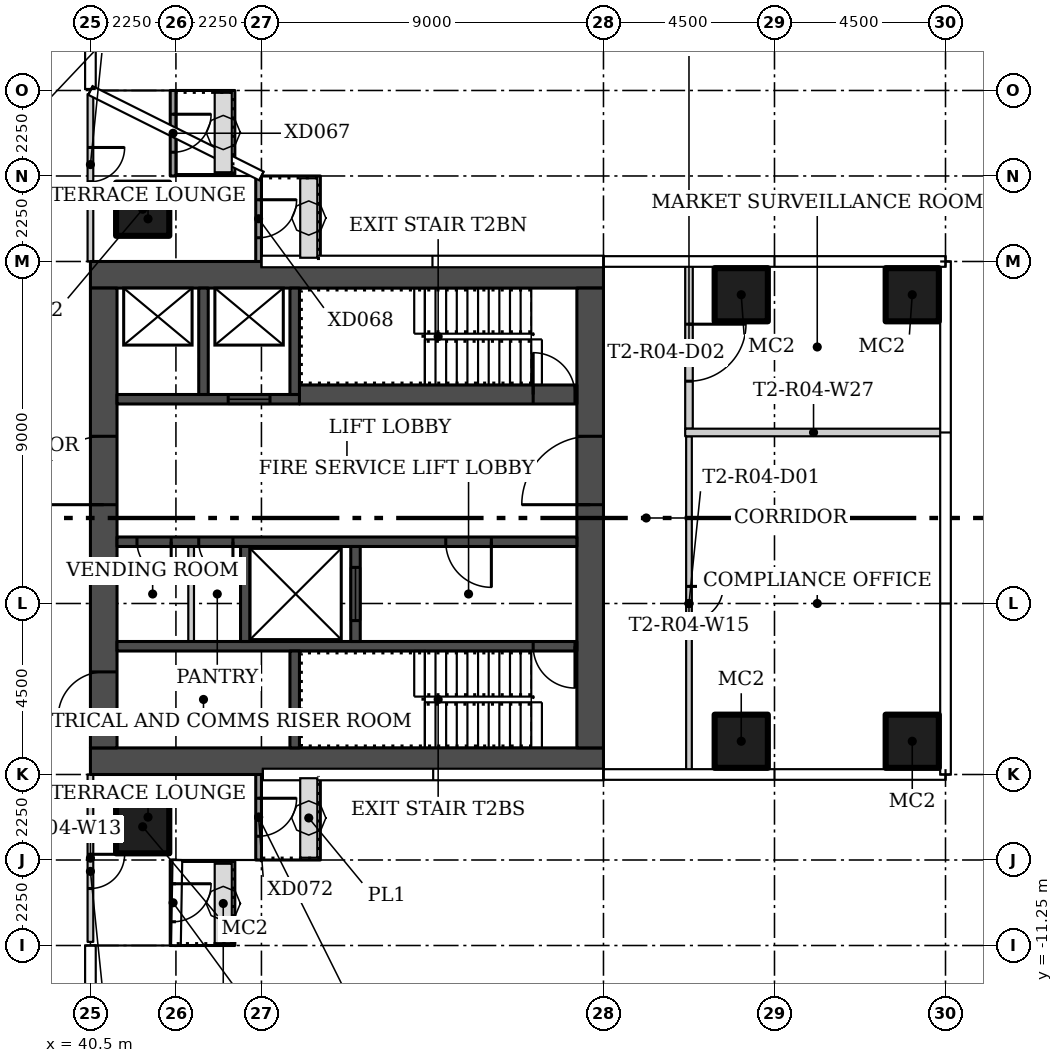
"""IFC4 building model, lengths in metres.
Left out: names, types, materials, properties, quantities, classifications, styles, units other than length and angle.
Written with IfcOpenShell. Run it as: python <this file> out.ifc"""

import sys

from ifc_helpers import new_model, si_unit, direction, frame, frame_2d, origin, origin_2d, place, context, subcontext, project, spatial, rectangle, hollow_rectangle, extrude, element, fill, save


model = new_model("IFC4")
c1 = context("Model", 3, precision=1e-05, world=origin(), true_north=direction((0.0, 1.0)))
c2 = subcontext(c1, "Body", "Model", "MODEL_VIEW")
j1 = project(units=[si_unit("LENGTHUNIT", "METRE"), si_unit("PLANEANGLEUNIT", "RADIAN")], contexts=[c1])
p1 = place(None, origin())
s1 = spatial("IfcSite", under=j1, at=p1, CompositionType="ELEMENT")
p2 = place(p1, origin())
s2 = spatial("IfcBuilding", under=s1, at=p2, CompositionType="ELEMENT")
p3 = place(p2, frame((0.0, 0.0, 53.7)))
s3 = spatial("IfcBuildingStorey", under=s2, at=p3, CompositionType="ELEMENT", Elevation=53.7)
for number, where in (
    (1, (41.875, 8.125, 0.0)),
    (2, (41.875, -8.125, 0.0)),
    (3, (57.625, -5.875, 0.0)),
    (4, (62.125, -5.875, 0.0)),
    (5, (57.625, 5.875, 0.0)),
    (6, (62.125, 5.875, 0.0)),
):
    element("IfcColumn", number, at=place(p3, frame(where)), inside=s3, PredefinedType="COLUMN", context=c2, shape_type="SweptSolid", body=[
        extrude(hollow_rectangle(XDim=1.4, YDim=1.4, WallThickness=0.05, at=origin_2d()), origin(), (0.0, 0.0, 1.0), 3.55),
    ])
p4 = place(p3, frame((40.5, -6.75, 0.0), z_axis=(0.0, 0.0, 1.0), x_axis=(0.0, -1.0, 0.0)))
e7 = element("IfcWall", 7, at=p4, inside=s3, PredefinedType="PARTITIONING", context=c2, shape_type="SweptSolid", body=[
    extrude(rectangle(XDim=4.405, YDim=0.15, at=frame_2d((2.203, 0.0))), origin(), (0.0, 0.0, 1.0), 3.55),
])
p5 = place(p4, frame((2.1, 0.0, 0.0)))
e8 = element("IfcOpeningElement", 8, at=p5, cuts=e7, PredefinedType="OPENING", context=c2, shape_type="SweptSolid", body=[
    extrude(rectangle(XDim=0.9, YDim=2.1, at=frame_2d((0.45, 1.05))), frame((0.0, 0.085, 0.0), z_axis=(0.0, -1.0, 0.0), x_axis=(1.0, 0.0, 0.0)), (0.0, 0.0, 1.0), 0.17),
])
p6 = place(p3, frame((40.5, 11.155, 0.0), z_axis=(0.0, 0.0, 1.0), x_axis=(0.0, -1.0, 0.0)))
e9 = element("IfcWall", 9, at=p6, inside=s3, PredefinedType="PARTITIONING", context=c2, shape_type="SweptSolid", body=[
    extrude(rectangle(XDim=4.405, YDim=0.15, at=frame_2d((2.203, 0.0))), origin(), (0.0, 0.0, 1.0), 3.55),
])
p7 = place(p6, frame((1.405, 0.0, 0.0)))
e10 = element("IfcOpeningElement", 10, at=p7, cuts=e9, PredefinedType="OPENING", context=c2, shape_type="SweptSolid", body=[
    extrude(rectangle(XDim=0.9, YDim=2.1, at=frame_2d((0.45, 1.05))), frame((0.0, 0.085, 0.0), z_axis=(0.0, -1.0, 0.0), x_axis=(1.0, 0.0, 0.0)), (0.0, 0.0, 1.0), 0.17),
])
p8 = place(p3, frame((56.25, 2.15, 0.0), z_axis=(0.0, 0.0, 1.0), x_axis=(0.0, -1.0, 0.0)))
e11 = element("IfcWall", 11, at=p8, inside=s3, PredefinedType="PARTITIONING", context=c2, shape_type="SweptSolid", body=[
    extrude(rectangle(XDim=8.805, YDim=0.15, at=frame_2d((4.402, 0.0))), origin(), (0.0, 0.0, 1.0), 3.55),
])
p9 = place(p8, frame((3.95, 0.0, 0.0)))
e12 = element("IfcOpeningElement", 12, at=p9, cuts=e11, PredefinedType="OPENING", context=c2, shape_type="SweptSolid", body=[
    extrude(rectangle(XDim=0.9, YDim=2.1, at=frame_2d((0.45, 1.05))), frame((0.0, 0.085, 0.0), z_axis=(0.0, -1.0, 0.0), x_axis=(1.0, 0.0, 0.0)), (0.0, 0.0, 1.0), 0.17),
])
p10 = place(p3, frame((56.25, 6.655, 0.0), z_axis=(0.0, 0.0, 1.0), x_axis=(0.0, -1.0, 0.0)))
e13 = element("IfcWall", 13, at=p10, inside=s3, PredefinedType="PARTITIONING", context=c2, shape_type="SweptSolid", body=[
    extrude(rectangle(XDim=4.305, YDim=0.2, at=frame_2d((2.152, 0.0))), origin(), (0.0, 0.0, 1.0), 3.55),
])
p11 = place(p10, frame((1.555, 0.0, 0.0)))
e14 = element("IfcOpeningElement", 14, at=p11, cuts=e13, PredefinedType="OPENING", context=c2, shape_type="SweptSolid", body=[
    extrude(rectangle(XDim=1.5, YDim=2.1, at=frame_2d((0.75, 1.05))), frame((0.0, 0.11, 0.0), z_axis=(0.0, -1.0, 0.0), x_axis=(1.0, 0.0, 0.0)), (0.0, 0.0, 1.0), 0.22),
])
p12 = place(p3, frame((62.905, 2.25, 0.0), z_axis=(0.0, 0.0, 1.0), x_axis=(-1.0, 0.0, 0.0)))
e15 = element("IfcWall", 15, at=p12, inside=s3, PredefinedType="PARTITIONING", context=c2, shape_type="SweptSolid", body=[
    extrude(rectangle(XDim=6.755, YDim=0.2, at=frame_2d((3.377, 0.0))), origin(), (0.0, 0.0, 1.0), 3.55),
])
p13 = place(p3, frame((42.675, 11.25, 0.0), z_axis=(0.0, 0.0, 1.0), x_axis=(0.0, -1.0, 0.0)))
e16 = element("IfcWall", 16, at=p13, inside=s3, PredefinedType="SOLIDWALL", context=c2, shape_type="SweptSolid", body=[
    extrude(rectangle(XDim=2.25, YDim=0.15, at=frame_2d((1.125, 0.0))), origin(), (0.0, 0.0, 1.0), 3.45),
])
p14 = place(p13, frame((0.625, 0.0, 0.0)))
e17 = element("IfcOpeningElement", 17, at=p14, cuts=e16, PredefinedType="OPENING", context=c2, shape_type="SweptSolid", body=[
    extrude(rectangle(XDim=1.0, YDim=2.4, at=frame_2d((0.5, 1.2))), frame((0.0, 0.085, 0.0), z_axis=(0.0, -1.0, 0.0), x_axis=(1.0, 0.0, 0.0)), (0.0, 0.0, 1.0), 0.17),
])
p15 = place(p3, frame((44.925, 9.0, 0.0), z_axis=(0.0, 0.0, 1.0), x_axis=(0.0, -1.0, 0.0)))
e18 = element("IfcWall", 18, at=p15, inside=s3, PredefinedType="SOLIDWALL", context=c2, shape_type="SweptSolid", body=[
    extrude(rectangle(XDim=2.257, YDim=0.15, at=frame_2d((1.128, 0.0))), origin(), (0.0, 0.0, 1.0), 3.45),
])
p16 = place(p15, frame((0.625, 0.0, 0.0)))
e19 = element("IfcOpeningElement", 19, at=p16, cuts=e18, PredefinedType="OPENING", context=c2, shape_type="SweptSolid", body=[
    extrude(rectangle(XDim=1.0, YDim=2.4, at=frame_2d((0.5, 1.2))), frame((0.0, 0.085, 0.0), z_axis=(0.0, -1.0, 0.0), x_axis=(1.0, 0.0, 0.0)), (0.0, 0.0, 1.0), 0.17),
])
p17 = place(p3, frame((42.675, -9.0, 0.0), z_axis=(0.0, 0.0, 1.0), x_axis=(0.0, -1.0, 0.0)))
e20 = element("IfcWall", 20, at=p17, inside=s3, PredefinedType="SOLIDWALL", context=c2, shape_type="SweptSolid", body=[
    extrude(rectangle(XDim=2.25, YDim=0.15, at=frame_2d((1.125, 0.0))), origin(), (0.0, 0.0, 1.0), 3.45),
])
p18 = place(p17, frame((0.625, 0.0, 0.0)))
e21 = element("IfcOpeningElement", 21, at=p18, cuts=e20, PredefinedType="OPENING", context=c2, shape_type="SweptSolid", body=[
    extrude(rectangle(XDim=1.0, YDim=2.4, at=frame_2d((0.5, 1.2))), frame((0.0, 0.085, 0.0), z_axis=(0.0, -1.0, 0.0), x_axis=(1.0, 0.0, 0.0)), (0.0, 0.0, 1.0), 0.17),
])
p19 = place(p3, frame((44.925, -6.743, 0.0), z_axis=(0.0, 0.0, 1.0), x_axis=(0.0, -1.0, 0.0)))
e22 = element("IfcWall", 22, at=p19, inside=s3, PredefinedType="SOLIDWALL", context=c2, shape_type="SweptSolid", body=[
    extrude(rectangle(XDim=2.257, YDim=0.15, at=frame_2d((1.128, 0.0))), origin(), (0.0, 0.0, 1.0), 3.45),
])
p20 = place(p19, frame((0.632, 0.0, 0.0)))
e23 = element("IfcOpeningElement", 23, at=p20, cuts=e22, PredefinedType="OPENING", context=c2, shape_type="SweptSolid", body=[
    extrude(rectangle(XDim=1.0, YDim=2.4, at=frame_2d((0.5, 1.2))), frame((0.0, 0.085, 0.0), z_axis=(0.0, -1.0, 0.0), x_axis=(1.0, 0.0, 0.0)), (0.0, 0.0, 1.0), 0.17),
])
for number, where, z_axis, x_axis in (
    (24, (54.0, -6.4, 0.0), (0.0, 0.0, 1.0), (-1.0, 0.0, 0.0)),
    (25, (54.0, 6.4, 0.0), (0.0, 0.0, 1.0), (-1.0, 0.0, 0.0)),
):
    element("IfcWall", number, at=place(p3, frame(where, z_axis=z_axis, x_axis=x_axis)), inside=s3, PredefinedType="SHEAR", context=c2, shape_type="SweptSolid", body=[
        extrude(rectangle(XDim=13.5, YDim=0.7, at=frame_2d((6.75, 0.0))), origin(), (0.0, 0.0, 1.0), 3.55),
    ])
p21 = place(p3, frame((53.65, -6.05, 0.0), z_axis=(0.0, 0.0, 1.0), x_axis=(0.0, 1.0, 0.0)))
e26 = element("IfcWall", 26, at=p21, inside=s3, PredefinedType="SHEAR", context=c2, shape_type="SweptSolid", body=[
    extrude(rectangle(XDim=12.1, YDim=0.7, at=frame_2d((6.05, 0.0))), origin(), (0.0, 0.0, 1.0), 3.55),
])
p22 = place(p21, frame((6.4, 0.0, 0.0)))
e27 = element("IfcOpeningElement", 27, at=p22, cuts=e26, PredefinedType="OPENING", context=c2, shape_type="SweptSolid", body=[
    extrude(rectangle(XDim=1.8, YDim=2.4, at=frame_2d((0.9, 1.2))), frame((0.0, 0.36, 0.0), z_axis=(0.0, -1.0, 0.0), x_axis=(1.0, 0.0, 0.0)), (0.0, 0.0, 1.0), 0.72),
])
p23 = place(p3, frame((40.85, -6.05, 0.0), z_axis=(0.0, 0.0, 1.0), x_axis=(0.0, 1.0, 0.0)))
e28 = element("IfcWall", 28, at=p23, inside=s3, PredefinedType="SHEAR", context=c2, shape_type="SweptSolid", body=[
    extrude(rectangle(XDim=12.1, YDim=0.7, at=frame_2d((6.05, 0.0))), origin(), (0.0, 0.0, 1.0), 3.55),
])
p24 = place(p23, frame((0.8, 0.0, 0.0)))
e29 = element("IfcOpeningElement", 29, at=p24, cuts=e28, PredefinedType="OPENING", context=c2, shape_type="SweptSolid", body=[
    extrude(rectangle(XDim=1.2, YDim=2.1, at=frame_2d((0.6, 1.05))), frame((0.0, 0.36, 0.0), z_axis=(0.0, -1.0, 0.0), x_axis=(1.0, 0.0, 0.0)), (0.0, 0.0, 1.0), 0.72),
])
p25 = place(p23, frame((6.4, 0.0, 0.0)))
e30 = element("IfcOpeningElement", 30, at=p25, cuts=e28, PredefinedType="OPENING", context=c2, shape_type="SweptSolid", body=[
    extrude(rectangle(XDim=1.8, YDim=2.4, at=frame_2d((0.9, 1.2))), frame((0.0, 0.36, 0.0), z_axis=(0.0, -1.0, 0.0), x_axis=(1.0, 0.0, 0.0)), (0.0, 0.0, 1.0), 0.72),
])
p26 = place(p3, frame((53.3, -3.375, 0.0), z_axis=(0.0, 0.0, 1.0), x_axis=(-1.0, 0.0, 0.0)))
e31 = element("IfcWall", 31, at=p26, inside=s3, PredefinedType="SHEAR", context=c2, shape_type="SweptSolid", body=[
    extrude(rectangle(XDim=12.1, YDim=0.25, at=frame_2d((6.05, 0.0))), origin(), (0.0, 0.0, 1.0), 3.55),
])
p27 = place(p26, frame((0.05, 0.0, 0.0)))
e32 = element("IfcOpeningElement", 32, at=p27, cuts=e31, PredefinedType="OPENING", context=c2, shape_type="SweptSolid", body=[
    extrude(rectangle(XDim=1.1, YDim=2.1, at=frame_2d((0.55, 1.05))), frame((0.0, 0.135, 0.0), z_axis=(0.0, -1.0, 0.0), x_axis=(1.0, 0.0, 0.0)), (0.0, 0.0, 1.0), 0.27),
])
p28 = place(p3, frame((45.875, -6.05, 0.0), z_axis=(0.0, 0.0, 1.0), x_axis=(0.0, 1.0, 0.0)))
e33 = element("IfcWall", 33, at=p28, inside=s3, PredefinedType="SHEAR", context=c2, shape_type="SweptSolid", body=[
    extrude(rectangle(XDim=2.55, YDim=0.25, at=frame_2d((1.275, 0.0))), origin(), (0.0, 0.0, 1.0), 3.55),
])
p29 = place(p3, frame((53.3, -0.625, 0.0), z_axis=(0.0, 0.0, 1.0), x_axis=(-1.0, 0.0, 0.0)))
e34 = element("IfcWall", 34, at=p29, inside=s3, PredefinedType="SHEAR", context=c2, shape_type="SweptSolid", body=[
    extrude(rectangle(XDim=12.1, YDim=0.25, at=frame_2d((6.05, 0.0))), origin(), (0.0, 0.0, 1.0), 3.55),
])
p30 = place(p29, frame((2.25, 0.0, 0.0)))
e35 = element("IfcOpeningElement", 35, at=p30, cuts=e34, PredefinedType="OPENING", context=c2, shape_type="SweptSolid", body=[
    extrude(rectangle(XDim=1.2, YDim=2.1, at=frame_2d((0.6, 1.05))), frame((0.0, 0.135, 0.0), z_axis=(0.0, -1.0, 0.0), x_axis=(1.0, 0.0, 0.0)), (0.0, 0.0, 1.0), 0.27),
])
p31 = place(p29, frame((9.05, 0.0, 0.0)))
e36 = element("IfcOpeningElement", 36, at=p31, cuts=e34, PredefinedType="OPENING", context=c2, shape_type="SweptSolid", body=[
    extrude(rectangle(XDim=0.9, YDim=2.1, at=frame_2d((0.45, 1.05))), frame((0.0, 0.135, 0.0), z_axis=(0.0, -1.0, 0.0), x_axis=(1.0, 0.0, 0.0)), (0.0, 0.0, 1.0), 0.27),
])
p32 = place(p29, frame((10.675, 0.0, 0.0)))
e37 = element("IfcOpeningElement", 37, at=p32, cuts=e34, PredefinedType="OPENING", context=c2, shape_type="SweptSolid", body=[
    extrude(rectangle(XDim=0.9, YDim=2.1, at=frame_2d((0.45, 1.05))), frame((0.0, 0.135, 0.0), z_axis=(0.0, -1.0, 0.0), x_axis=(1.0, 0.0, 0.0)), (0.0, 0.0, 1.0), 0.27),
])
p33 = place(p3, frame((47.475, -3.25, 0.0), z_axis=(0.0, 0.0, 1.0), x_axis=(0.0, 1.0, 0.0)))
e38 = element("IfcWall", 38, at=p33, inside=s3, PredefinedType="SHEAR", context=c2, shape_type="SweptSolid", body=[
    extrude(rectangle(XDim=2.5, YDim=0.25, at=frame_2d((1.25, 0.0))), origin(), (0.0, 0.0, 1.0), 3.55),
])
p34 = place(p33, frame((0.55, 0.0, 0.0)))
e39 = element("IfcOpeningElement", 39, at=p34, cuts=e38, PredefinedType="OPENING", context=c2, shape_type="SweptSolid", body=[
    extrude(rectangle(XDim=1.4, YDim=2.4, at=frame_2d((0.7, 1.2))), frame((0.0, 0.135, 0.0), z_axis=(0.0, -1.0, 0.0), x_axis=(1.0, 0.0, 0.0)), (0.0, 0.0, 1.0), 0.27),
])
p35 = place(p3, frame((44.575, -3.25, 0.0), z_axis=(0.0, 0.0, 1.0), x_axis=(0.0, 1.0, 0.0)))
e40 = element("IfcWall", 40, at=p35, inside=s3, PredefinedType="SHEAR", context=c2, shape_type="SweptSolid", body=[
    extrude(rectangle(XDim=2.5, YDim=0.25, at=frame_2d((1.25, 0.0))), origin(), (0.0, 0.0, 1.0), 3.55),
])
p36 = place(p3, frame((43.15, -3.25, 0.0), z_axis=(0.0, 0.0, 1.0), x_axis=(0.0, 1.0, 0.0)))
e41 = element("IfcWall", 41, at=p36, inside=s3, PredefinedType="PARTITIONING", context=c2, shape_type="SweptSolid", body=[
    extrude(rectangle(XDim=2.5, YDim=0.15, at=frame_2d((1.25, 0.0))), origin(), (0.0, 0.0, 1.0), 3.55),
])
p37 = place(p3, frame((46.0, 3.25, 0.0)))
e42 = element("IfcWall", 42, at=p37, inside=s3, PredefinedType="SHEAR", context=c2, shape_type="SweptSolid", body=[
    extrude(rectangle(XDim=7.3, YDim=0.5, at=frame_2d((3.65, 0.0))), origin(), (0.0, 0.0, 1.0), 3.55),
])
p38 = place(p37, frame((6.15, 0.0, 0.0)))
e43 = element("IfcOpeningElement", 43, at=p38, cuts=e42, PredefinedType="OPENING", context=c2, shape_type="SweptSolid", body=[
    extrude(rectangle(XDim=1.1, YDim=2.1, at=frame_2d((0.55, 1.05))), frame((0.0, 0.26, 0.0), z_axis=(0.0, -1.0, 0.0), x_axis=(1.0, 0.0, 0.0)), (0.0, 0.0, 1.0), 0.52),
])
p39 = place(p3, frame((46.0, 3.125, 0.0), z_axis=(0.0, 0.0, 1.0), x_axis=(-1.0, 0.0, 0.0)))
e44 = element("IfcWall", 44, at=p39, inside=s3, PredefinedType="SHEAR", context=c2, shape_type="SweptSolid", body=[
    extrude(rectangle(XDim=4.8, YDim=0.25, at=frame_2d((2.4, 0.0))), origin(), (0.0, 0.0, 1.0), 3.55),
])
p40 = place(p39, frame((0.775, 0.0, 0.0)))
e45 = element("IfcOpeningElement", 45, at=p40, cuts=e44, PredefinedType="OPENING", context=c2, shape_type="SweptSolid", body=[
    extrude(rectangle(XDim=1.1, YDim=2.1, at=frame_2d((0.55, 1.05))), frame((0.0, 0.135, 0.0), z_axis=(0.0, -1.0, 0.0), x_axis=(1.0, 0.0, 0.0)), (0.0, 0.0, 1.0), 0.27),
])
for number, where, z_axis, x_axis in (
    (46, (45.875, 3.25, 0.0), (0.0, 0.0, 1.0), (0.0, 1.0, 0.0)),
    (47, (43.475, 3.25, 0.0), (0.0, 0.0, 1.0), (0.0, 1.0, 0.0)),
):
    element("IfcWall", number, at=place(p3, frame(where, z_axis=z_axis, x_axis=x_axis)), inside=s3, PredefinedType="SHEAR", context=c2, shape_type="SweptSolid", body=[
        extrude(rectangle(XDim=2.8, YDim=0.25, at=frame_2d((1.4, 0.0))), origin(), (0.0, 0.0, 1.0), 3.55),
    ])
p41 = place(p9, origin())
e48 = element("IfcDoor", 48, at=p41, inside=s3, OperationType="SINGLE_SWING_LEFT", PredefinedType="DOOR", context=c2, shape_type="SweptSolid", body=[
    extrude(rectangle(XDim=0.9, YDim=2.1, at=frame_2d((0.45, 1.05))), frame((0.0, 0.025, 0.0), z_axis=(0.0, -1.0, 0.0), x_axis=(1.0, 0.0, 0.0)), (0.0, 0.0, 1.0), 0.05),
])
fill(e12, e48)
p42 = place(p11, origin())
e49 = element("IfcDoor", 49, at=p42, inside=s3, OperationType="DOUBLE_DOOR_SINGLE_SWING", PredefinedType="DOOR", context=c2, shape_type="SweptSolid", body=[
    extrude(rectangle(XDim=1.5, YDim=2.1, at=frame_2d((0.75, 1.05))), frame((0.0, 0.025, 0.0), z_axis=(0.0, -1.0, 0.0), x_axis=(1.0, 0.0, 0.0)), (0.0, 0.0, 1.0), 0.05),
])
fill(e14, e49)
p43 = place(p5, origin())
e50 = element("IfcDoor", 50, at=p43, inside=s3, OperationType="SINGLE_SWING_RIGHT", PredefinedType="DOOR", context=c2, shape_type="SweptSolid", body=[
    extrude(rectangle(XDim=0.9, YDim=2.1, at=frame_2d((0.45, 1.05))), frame((0.0, 0.025, 0.0), z_axis=(0.0, -1.0, 0.0), x_axis=(1.0, 0.0, 0.0)), (0.0, 0.0, 1.0), 0.05),
])
fill(e8, e50)
p44 = place(p7, origin())
e51 = element("IfcDoor", 51, at=p44, inside=s3, OperationType="SINGLE_SWING_LEFT", PredefinedType="DOOR", context=c2, shape_type="SweptSolid", body=[
    extrude(rectangle(XDim=0.9, YDim=2.1, at=frame_2d((0.45, 1.05))), frame((0.0, 0.025, 0.0), z_axis=(0.0, -1.0, 0.0), x_axis=(1.0, 0.0, 0.0)), (0.0, 0.0, 1.0), 0.05),
])
fill(e10, e51)
p45 = place(p14, origin())
e52 = element("IfcDoor", 52, at=p45, inside=s3, OperationType="SINGLE_SWING_RIGHT", PredefinedType="DOOR", context=c2, shape_type="SweptSolid", body=[
    extrude(rectangle(XDim=1.0, YDim=2.4, at=frame_2d((0.5, 1.2))), frame((0.0, 0.025, 0.0), z_axis=(0.0, -1.0, 0.0), x_axis=(1.0, 0.0, 0.0)), (0.0, 0.0, 1.0), 0.05),
])
fill(e17, e52)
p46 = place(p16, origin())
e53 = element("IfcDoor", 53, at=p46, inside=s3, OperationType="SINGLE_SWING_LEFT", PredefinedType="DOOR", context=c2, shape_type="SweptSolid", body=[
    extrude(rectangle(XDim=1.0, YDim=2.4, at=frame_2d((0.5, 1.2))), frame((0.0, 0.025, 0.0), z_axis=(0.0, -1.0, 0.0), x_axis=(1.0, 0.0, 0.0)), (0.0, 0.0, 1.0), 0.05),
])
fill(e19, e53)
p47 = place(p18, origin())
e54 = element("IfcDoor", 54, at=p47, inside=s3, OperationType="SINGLE_SWING_LEFT", PredefinedType="DOOR", context=c2, shape_type="SweptSolid", body=[
    extrude(rectangle(XDim=1.0, YDim=2.4, at=frame_2d((0.5, 1.2))), frame((0.0, 0.025, 0.0), z_axis=(0.0, -1.0, 0.0), x_axis=(1.0, 0.0, 0.0)), (0.0, 0.0, 1.0), 0.05),
])
fill(e21, e54)
p48 = place(p20, origin())
e55 = element("IfcDoor", 55, at=p48, inside=s3, OperationType="SINGLE_SWING_RIGHT", PredefinedType="DOOR", context=c2, shape_type="SweptSolid", body=[
    extrude(rectangle(XDim=1.0, YDim=2.4, at=frame_2d((0.5, 1.2))), frame((0.0, 0.025, 0.0), z_axis=(0.0, -1.0, 0.0), x_axis=(1.0, 0.0, 0.0)), (0.0, 0.0, 1.0), 0.05),
])
fill(e23, e55)
p49 = place(p22, origin())
e56 = element("IfcDoor", 56, at=p49, inside=s3, OperationType="DOUBLE_DOOR_SINGLE_SWING", PredefinedType="DOOR", context=c2, shape_type="SweptSolid", body=[
    extrude(rectangle(XDim=1.8, YDim=2.4, at=frame_2d((0.9, 1.2))), frame((0.0, 0.025, 0.0), z_axis=(0.0, -1.0, 0.0), x_axis=(1.0, 0.0, 0.0)), (0.0, 0.0, 1.0), 0.05),
])
fill(e27, e56)
p50 = place(p24, origin())
e57 = element("IfcDoor", 57, at=p50, inside=s3, OperationType="SINGLE_SWING_LEFT", PredefinedType="DOOR", context=c2, shape_type="SweptSolid", body=[
    extrude(rectangle(XDim=1.2, YDim=2.1, at=frame_2d((0.6, 1.05))), frame((0.0, 0.025, 0.0), z_axis=(0.0, -1.0, 0.0), x_axis=(1.0, 0.0, 0.0)), (0.0, 0.0, 1.0), 0.05),
])
fill(e29, e57)
p51 = place(p25, origin())
e58 = element("IfcDoor", 58, at=p51, inside=s3, OperationType="DOUBLE_DOOR_SINGLE_SWING", PredefinedType="DOOR", context=c2, shape_type="SweptSolid", body=[
    extrude(rectangle(XDim=1.8, YDim=2.4, at=frame_2d((0.9, 1.2))), frame((0.0, 0.025, 0.0), z_axis=(0.0, -1.0, 0.0), x_axis=(1.0, 0.0, 0.0)), (0.0, 0.0, 1.0), 0.05),
])
fill(e30, e58)
p52 = place(p27, origin())
e59 = element("IfcDoor", 59, at=p52, inside=s3, OperationType="SINGLE_SWING_LEFT", PredefinedType="DOOR", context=c2, shape_type="SweptSolid", body=[
    extrude(rectangle(XDim=1.1, YDim=2.1, at=frame_2d((0.55, 1.05))), frame((0.0, 0.025, 0.0), z_axis=(0.0, -1.0, 0.0), x_axis=(1.0, 0.0, 0.0)), (0.0, 0.0, 1.0), 0.05),
])
fill(e32, e59)
p53 = place(p30, origin())
e60 = element("IfcDoor", 60, at=p53, inside=s3, OperationType="SINGLE_SWING_LEFT", PredefinedType="DOOR", context=c2, shape_type="SweptSolid", body=[
    extrude(rectangle(XDim=1.2, YDim=2.1, at=frame_2d((0.6, 1.05))), frame((0.0, 0.025, 0.0), z_axis=(0.0, -1.0, 0.0), x_axis=(1.0, 0.0, 0.0)), (0.0, 0.0, 1.0), 0.05),
])
fill(e35, e60)
p54 = place(p31, origin())
e61 = element("IfcDoor", 61, at=p54, inside=s3, OperationType="SINGLE_SWING_RIGHT", PredefinedType="DOOR", context=c2, shape_type="SweptSolid", body=[
    extrude(rectangle(XDim=0.9, YDim=2.1, at=frame_2d((0.45, 1.05))), frame((0.0, 0.025, 0.0), z_axis=(0.0, -1.0, 0.0), x_axis=(1.0, 0.0, 0.0)), (0.0, 0.0, 1.0), 0.05),
])
fill(e36, e61)
p55 = place(p32, origin())
e62 = element("IfcDoor", 62, at=p55, inside=s3, OperationType="SINGLE_SWING_RIGHT", PredefinedType="DOOR", context=c2, shape_type="SweptSolid", body=[
    extrude(rectangle(XDim=0.9, YDim=2.1, at=frame_2d((0.45, 1.05))), frame((0.0, 0.025, 0.0), z_axis=(0.0, -1.0, 0.0), x_axis=(1.0, 0.0, 0.0)), (0.0, 0.0, 1.0), 0.05),
])
fill(e37, e62)
p56 = place(p34, origin())
e63 = element("IfcDoor", 63, at=p56, inside=s3, OperationType="SLIDING_TO_LEFT", PredefinedType="DOOR", context=c2, shape_type="SweptSolid", body=[
    extrude(rectangle(XDim=1.4, YDim=2.4, at=frame_2d((0.7, 1.2))), frame((0.0, 0.025, 0.0), z_axis=(0.0, -1.0, 0.0), x_axis=(1.0, 0.0, 0.0)), (0.0, 0.0, 1.0), 0.05),
])
fill(e39, e63)
p57 = place(p38, origin())
e64 = element("IfcDoor", 64, at=p57, inside=s3, OperationType="SINGLE_SWING_RIGHT", PredefinedType="DOOR", context=c2, shape_type="SweptSolid", body=[
    extrude(rectangle(XDim=1.1, YDim=2.1, at=frame_2d((0.55, 1.05))), frame((0.0, 0.025, 0.0), z_axis=(0.0, -1.0, 0.0), x_axis=(1.0, 0.0, 0.0)), (0.0, 0.0, 1.0), 0.05),
])
fill(e43, e64)
p58 = place(p40, origin())
e65 = element("IfcDoor", 65, at=p58, inside=s3, OperationType="SLIDING_TO_LEFT", PredefinedType="DOOR", context=c2, shape_type="SweptSolid", body=[
    extrude(rectangle(XDim=1.1, YDim=2.1, at=frame_2d((0.55, 1.05))), frame((0.0, 0.025, 0.0), z_axis=(0.0, -1.0, 0.0), x_axis=(1.0, 0.0, 0.0)), (0.0, 0.0, 1.0), 0.05),
])
fill(e45, e65)
save(model, sys.argv[1])
